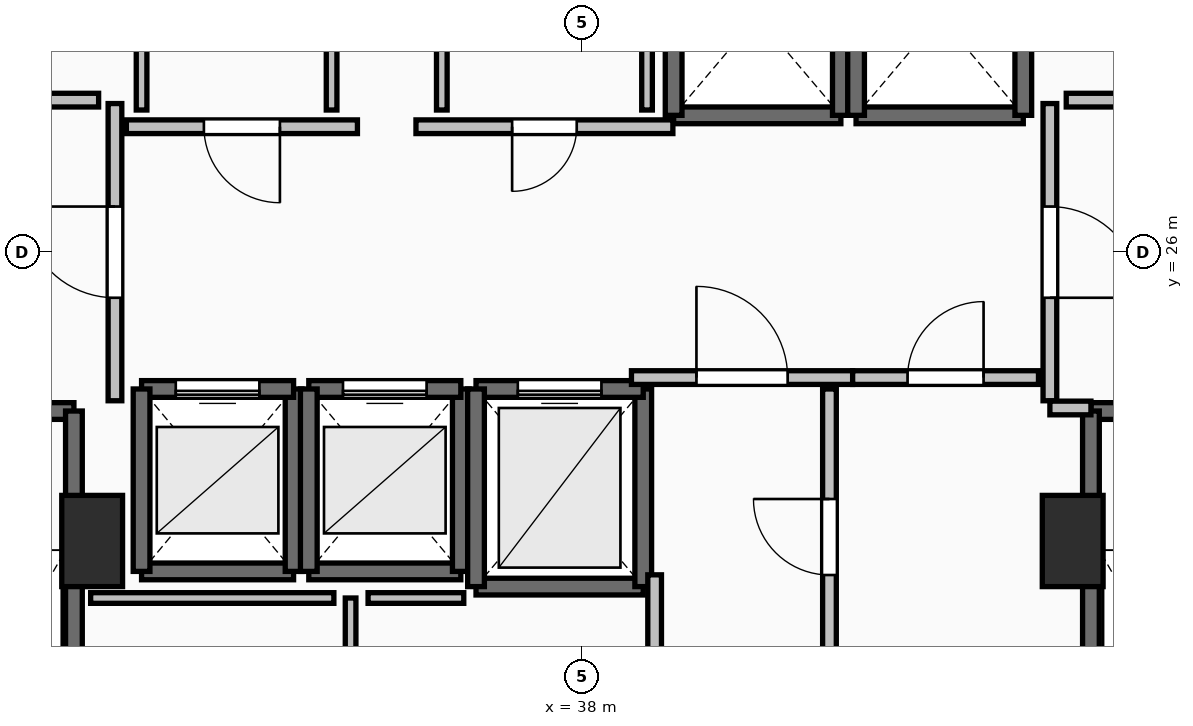
"""IFC4 building model, lengths in metres.
Left out: names, types, materials, properties, quantities, classifications, styles, units other than length and angle.
Written with IfcOpenShell. Run it as: python <this file> out.ifc"""

import sys

from ifc_helpers import new_model, si_unit, direction, frame, frame_2d, origin, origin_2d, place, context, subcontext, project, spatial, rectangle, extrude, element, fill, save


model = new_model("IFC4")
c1 = context("Model", 3, precision=1e-05, world=origin(), true_north=direction((0.0, 1.0)))
c2 = subcontext(c1, "Body", "Model", "MODEL_VIEW")
j1 = project(units=[si_unit("LENGTHUNIT", "METRE"), si_unit("PLANEANGLEUNIT", "RADIAN")], contexts=[c1])
p1 = place(None, origin())
s1 = spatial("IfcSite", under=j1, at=p1, CompositionType="ELEMENT")
p2 = place(p1, origin())
s2 = spatial("IfcBuilding", under=s1, at=p2, CompositionType="ELEMENT")
p3 = place(p2, frame((0.0, 0.0, 129.1)))
s3 = spatial("IfcBuildingStorey", under=s2, at=p3, CompositionType="ELEMENT", Elevation=129.1)
for number, where, z_axis, x_axis in (
    (1, (31.55, 22.2, 0.0), (0.0, 0.0, 1.0), (1.0, 0.0, 0.0)),
    (2, (44.45, 22.2, 0.0), (0.0, 0.0, 1.0), (1.0, 0.0, 0.0)),
):
    element("IfcColumn", number, at=place(p3, frame(where, z_axis=z_axis, x_axis=x_axis)), inside=s3, PredefinedType="PILASTER", context=c2, shape_type="SweptSolid", body=[
        extrude(rectangle(XDim=0.8, YDim=1.2, at=origin_2d()), origin(), (0.0, 0.0, 1.0), 3.5),
    ])
p4 = place(p3, frame((27.94, 23.91, 0.0), z_axis=(0.0, 0.0, 1.0), x_axis=(1.0, 0.0, 0.0)))
e3 = element("IfcWall", 3, at=p4, inside=s3, PredefinedType="SOLIDWALL", context=c2, shape_type="SweptSolid", body=[
    extrude(rectangle(XDim=3.37, YDim=0.22, at=frame_2d((1.685, 0.0))), origin(), (0.0, 0.0, 1.0), 3.24),
])
p5 = place(p4, frame((1.135, 0.0, 0.0)))
e4 = element("IfcOpeningElement", 4, at=p5, cuts=e3, PredefinedType="OPENING", context=c2, shape_type="SweptSolid", body=[
    extrude(rectangle(XDim=1.1, YDim=2.15, at=frame_2d((0.55, 1.075))), frame((0.0, 0.125, 0.0), z_axis=(0.0, -1.0, 0.0), x_axis=(1.0, 0.0, 0.0)), (0.0, 0.0, 1.0), 0.25),
])
p6 = place(p3, frame((31.31, 23.91, 0.0), z_axis=(0.0, 0.0, 1.0), x_axis=(0.0, -1.0, 0.0)))
e5 = element("IfcWall", 5, at=p6, inside=s3, PredefinedType="SOLIDWALL", context=c2, shape_type="SweptSolid", body=[
    extrude(rectangle(XDim=7.42, YDim=0.22, at=frame_2d((3.71, 0.0))), origin(), (0.0, 0.0, 1.0), 3.24),
])
p7 = place(p3, frame((44.69, 23.91, 0.0), z_axis=(0.0, 0.0, 1.0), x_axis=(1.0, 0.0, 0.0)))
e6 = element("IfcWall", 6, at=p7, inside=s3, PredefinedType="SOLIDWALL", context=c2, shape_type="SweptSolid", body=[
    extrude(rectangle(XDim=3.37, YDim=0.22, at=frame_2d((1.685, 0.0))), origin(), (0.0, 0.0, 1.0), 3.24),
])
p8 = place(p7, frame((1.135, 0.0, 0.0)))
e7 = element("IfcOpeningElement", 7, at=p8, cuts=e6, PredefinedType="OPENING", context=c2, shape_type="SweptSolid", body=[
    extrude(rectangle(XDim=1.1, YDim=2.15, at=frame_2d((0.55, 1.075))), frame((0.0, 0.125, 0.0), z_axis=(0.0, -1.0, 0.0), x_axis=(1.0, 0.0, 0.0)), (0.0, 0.0, 1.0), 0.25),
])
p9 = place(p3, frame((44.69, 16.49, 0.0), z_axis=(0.0, 0.0, 1.0), x_axis=(0.0, 1.0, 0.0)))
e8 = element("IfcWall", 8, at=p9, inside=s3, PredefinedType="SOLIDWALL", context=c2, shape_type="SweptSolid", body=[
    extrude(rectangle(XDim=7.42, YDim=0.22, at=frame_2d((3.71, 0.0))), origin(), (0.0, 0.0, 1.0), 3.24),
])
p10 = place(p3, frame((32.2, 21.8, 0.0), z_axis=(0.0, 0.0, 1.0), x_axis=(1.0, 0.0, 0.0)))
e9 = element("IfcWall", 9, at=p10, inside=s3, PredefinedType="SOLIDWALL", context=c2, shape_type="SweptSolid", body=[
    extrude(rectangle(XDim=2.0, YDim=0.22, at=frame_2d((1.0, 0.0))), origin(), (0.0, 0.0, 1.0), 3.24),
])
p11 = place(p3, frame((34.2, 21.8, 0.0), z_axis=(0.0, 0.0, 1.0), x_axis=(0.0, 1.0, 0.0)))
e10 = element("IfcWall", 10, at=p11, inside=s3, PredefinedType="SOLIDWALL", context=c2, shape_type="SweptSolid", body=[
    extrude(rectangle(XDim=2.4, YDim=0.22, at=frame_2d((1.2, 0.0))), origin(), (0.0, 0.0, 1.0), 3.24),
])
p12 = place(p3, frame((34.2, 24.2, 0.0), z_axis=(0.0, 0.0, 1.0), x_axis=(-1.0, 0.0, 0.0)))
e11 = element("IfcWall", 11, at=p12, inside=s3, PredefinedType="SOLIDWALL", context=c2, shape_type="SweptSolid", body=[
    extrude(rectangle(XDim=2.0, YDim=0.22, at=frame_2d((1.0, 0.0))), origin(), (0.0, 0.0, 1.0), 3.24),
])
p13 = place(p12, frame((0.45, 0.0, 0.0)))
e12 = element("IfcOpeningElement", 12, at=p13, cuts=e11, PredefinedType="OPENING", context=c2, shape_type="SweptSolid", body=[
    extrude(rectangle(XDim=1.1, YDim=2.2, at=frame_2d((0.55, 1.1))), frame((0.0, 0.125, 0.0), z_axis=(0.0, -1.0, 0.0), x_axis=(1.0, 0.0, 0.0)), (0.0, 0.0, 1.0), 0.25),
])
p14 = place(p3, frame((32.2, 24.2, 0.0), z_axis=(0.0, 0.0, 1.0), x_axis=(0.0, -1.0, 0.0)))
e13 = element("IfcWall", 13, at=p14, inside=s3, PredefinedType="SOLIDWALL", context=c2, shape_type="SweptSolid", body=[
    extrude(rectangle(XDim=2.4, YDim=0.22, at=frame_2d((1.2, 0.0))), origin(), (0.0, 0.0, 1.0), 3.24),
])
p15 = place(p3, frame((34.4, 21.8, 0.0), z_axis=(0.0, 0.0, 1.0), x_axis=(1.0, 0.0, 0.0)))
e14 = element("IfcWall", 14, at=p15, inside=s3, PredefinedType="SOLIDWALL", context=c2, shape_type="SweptSolid", body=[
    extrude(rectangle(XDim=2.0, YDim=0.22, at=frame_2d((1.0, 0.0))), origin(), (0.0, 0.0, 1.0), 3.24),
])
p16 = place(p3, frame((36.4, 21.8, 0.0), z_axis=(0.0, 0.0, 1.0), x_axis=(0.0, 1.0, 0.0)))
e15 = element("IfcWall", 15, at=p16, inside=s3, PredefinedType="SOLIDWALL", context=c2, shape_type="SweptSolid", body=[
    extrude(rectangle(XDim=2.4, YDim=0.22, at=frame_2d((1.2, 0.0))), origin(), (0.0, 0.0, 1.0), 3.24),
])
p17 = place(p3, frame((36.4, 24.2, 0.0), z_axis=(0.0, 0.0, 1.0), x_axis=(-1.0, 0.0, 0.0)))
e16 = element("IfcWall", 16, at=p17, inside=s3, PredefinedType="SOLIDWALL", context=c2, shape_type="SweptSolid", body=[
    extrude(rectangle(XDim=2.0, YDim=0.22, at=frame_2d((1.0, 0.0))), origin(), (0.0, 0.0, 1.0), 3.24),
])
p18 = place(p17, frame((0.45, 0.0, 0.0)))
e17 = element("IfcOpeningElement", 17, at=p18, cuts=e16, PredefinedType="OPENING", context=c2, shape_type="SweptSolid", body=[
    extrude(rectangle(XDim=1.1, YDim=2.2, at=frame_2d((0.55, 1.1))), frame((0.0, 0.125, 0.0), z_axis=(0.0, -1.0, 0.0), x_axis=(1.0, 0.0, 0.0)), (0.0, 0.0, 1.0), 0.25),
])
p19 = place(p3, frame((34.4, 24.2, 0.0), z_axis=(0.0, 0.0, 1.0), x_axis=(0.0, -1.0, 0.0)))
e18 = element("IfcWall", 18, at=p19, inside=s3, PredefinedType="SOLIDWALL", context=c2, shape_type="SweptSolid", body=[
    extrude(rectangle(XDim=2.4, YDim=0.22, at=frame_2d((1.2, 0.0))), origin(), (0.0, 0.0, 1.0), 3.24),
])
p20 = place(p3, frame((36.6, 21.6, 0.0), z_axis=(0.0, 0.0, 1.0), x_axis=(1.0, 0.0, 0.0)))
e19 = element("IfcWall", 19, at=p20, inside=s3, PredefinedType="SOLIDWALL", context=c2, shape_type="SweptSolid", body=[
    extrude(rectangle(XDim=2.2, YDim=0.22, at=frame_2d((1.1, 0.0))), origin(), (0.0, 0.0, 1.0), 3.24),
])
p21 = place(p3, frame((38.8, 21.6, 0.0), z_axis=(0.0, 0.0, 1.0), x_axis=(0.0, 1.0, 0.0)))
e20 = element("IfcWall", 20, at=p21, inside=s3, PredefinedType="SOLIDWALL", context=c2, shape_type="SweptSolid", body=[
    extrude(rectangle(XDim=2.6, YDim=0.22, at=frame_2d((1.3, 0.0))), origin(), (0.0, 0.0, 1.0), 3.24),
])
p22 = place(p3, frame((38.8, 24.2, 0.0), z_axis=(0.0, 0.0, 1.0), x_axis=(-1.0, 0.0, 0.0)))
e21 = element("IfcWall", 21, at=p22, inside=s3, PredefinedType="SOLIDWALL", context=c2, shape_type="SweptSolid", body=[
    extrude(rectangle(XDim=2.2, YDim=0.22, at=frame_2d((1.1, 0.0))), origin(), (0.0, 0.0, 1.0), 3.24),
])
p23 = place(p22, frame((0.55, 0.0, 0.0)))
e22 = element("IfcOpeningElement", 22, at=p23, cuts=e21, PredefinedType="OPENING", context=c2, shape_type="SweptSolid", body=[
    extrude(rectangle(XDim=1.1, YDim=2.2, at=frame_2d((0.55, 1.1))), frame((0.0, 0.125, 0.0), z_axis=(0.0, -1.0, 0.0), x_axis=(1.0, 0.0, 0.0)), (0.0, 0.0, 1.0), 0.25),
])
p24 = place(p3, frame((36.6, 24.2, 0.0), z_axis=(0.0, 0.0, 1.0), x_axis=(0.0, -1.0, 0.0)))
e23 = element("IfcWall", 23, at=p24, inside=s3, PredefinedType="SOLIDWALL", context=c2, shape_type="SweptSolid", body=[
    extrude(rectangle(XDim=2.6, YDim=0.22, at=frame_2d((1.3, 0.0))), origin(), (0.0, 0.0, 1.0), 3.24),
])
p25 = place(p3, frame((39.2, 27.8, 0.0), z_axis=(0.0, 0.0, 1.0), x_axis=(1.0, 0.0, 0.0)))
e24 = element("IfcWall", 24, at=p25, inside=s3, PredefinedType="SOLIDWALL", context=c2, shape_type="SweptSolid", body=[
    extrude(rectangle(XDim=2.2, YDim=0.22, at=frame_2d((1.1, 0.0))), origin(), (0.0, 0.0, 1.0), 3.24),
])
for number, where, z_axis, x_axis in (
    (25, (41.4, 27.8, 0.0), (0.0, 0.0, 1.0), (0.0, 1.0, 0.0)),
    (26, (39.2, 30.4, 0.0), (0.0, 0.0, 1.0), (0.0, -1.0, 0.0)),
):
    element("IfcWall", number, at=place(p3, frame(where, z_axis=z_axis, x_axis=x_axis)), inside=s3, PredefinedType="SOLIDWALL", context=c2, shape_type="SweptSolid", body=[
        extrude(rectangle(XDim=2.6, YDim=0.22, at=frame_2d((1.3, 0.0))), origin(), (0.0, 0.0, 1.0), 3.24),
    ])
p26 = place(p3, frame((41.6, 27.8, 0.0), z_axis=(0.0, 0.0, 1.0), x_axis=(1.0, 0.0, 0.0)))
e27 = element("IfcWall", 27, at=p26, inside=s3, PredefinedType="SOLIDWALL", context=c2, shape_type="SweptSolid", body=[
    extrude(rectangle(XDim=2.2, YDim=0.22, at=frame_2d((1.1, 0.0))), origin(), (0.0, 0.0, 1.0), 3.24),
])
for number, where, z_axis, x_axis in (
    (28, (43.8, 27.8, 0.0), (0.0, 0.0, 1.0), (0.0, 1.0, 0.0)),
    (29, (41.6, 30.4, 0.0), (0.0, 0.0, 1.0), (0.0, -1.0, 0.0)),
):
    element("IfcWall", number, at=place(p3, frame(where, z_axis=z_axis, x_axis=x_axis)), inside=s3, PredefinedType="SOLIDWALL", context=c2, shape_type="SweptSolid", body=[
        extrude(rectangle(XDim=2.6, YDim=0.22, at=frame_2d((1.3, 0.0))), origin(), (0.0, 0.0, 1.0), 3.24),
    ])
p27 = place(p3, frame((31.85, 24.045, 0.0), z_axis=(0.0, 0.0, 1.0), x_axis=(0.0, 1.0, 0.0)))
e30 = element("IfcWall", 30, at=p27, inside=s3, PredefinedType="PARTITIONING", context=c2, shape_type="SweptSolid", body=[
    extrude(rectangle(XDim=3.91, YDim=0.18, at=frame_2d((1.955, 0.0))), origin(), (0.0, 0.0, 1.0), 3.24),
])
p28 = place(p27, frame((1.355, 0.0, 0.0)))
e31 = element("IfcOpeningElement", 31, at=p28, cuts=e30, PredefinedType="OPENING", context=c2, shape_type="SweptSolid", body=[
    extrude(rectangle(XDim=1.2, YDim=2.15, at=frame_2d((0.6, 1.075))), frame((0.0, 0.105, 0.0), z_axis=(0.0, -1.0, 0.0), x_axis=(1.0, 0.0, 0.0)), (0.0, 0.0, 1.0), 0.21),
])
p29 = place(p3, frame((44.15, 27.955, 0.0), z_axis=(0.0, 0.0, 1.0), x_axis=(0.0, -1.0, 0.0)))
e32 = element("IfcWall", 32, at=p29, inside=s3, PredefinedType="PARTITIONING", context=c2, shape_type="SweptSolid", body=[
    extrude(rectangle(XDim=3.91, YDim=0.18, at=frame_2d((1.955, 0.0))), origin(), (0.0, 0.0, 1.0), 3.24),
])
p30 = place(p29, frame((1.355, 0.0, 0.0)))
e33 = element("IfcOpeningElement", 33, at=p30, cuts=e32, PredefinedType="OPENING", context=c2, shape_type="SweptSolid", body=[
    extrude(rectangle(XDim=1.2, YDim=2.15, at=frame_2d((0.6, 1.075))), frame((0.0, 0.105, 0.0), z_axis=(0.0, -1.0, 0.0), x_axis=(1.0, 0.0, 0.0)), (0.0, 0.0, 1.0), 0.21),
])
p31 = place(p3, frame((44.15, 23.95, 0.0), z_axis=(0.0, 0.0, 1.0), x_axis=(1.0, 0.0, 0.0)))
e34 = element("IfcWall", 34, at=p31, inside=s3, PredefinedType="PARTITIONING", context=c2, shape_type="SweptSolid", body=[
    extrude(rectangle(XDim=0.54, YDim=0.18, at=frame_2d((0.27, 0.0))), origin(), (0.0, 0.0, 1.0), 3.24),
])
p32 = place(p3, frame((38.645, 24.35, 0.0), z_axis=(0.0, 0.0, 1.0), x_axis=(1.0, 0.0, 0.0)))
e35 = element("IfcWall", 35, at=p32, inside=s3, PredefinedType="PARTITIONING", context=c2, shape_type="SweptSolid", body=[
    extrude(rectangle(XDim=2.91, YDim=0.18, at=frame_2d((1.455, 0.0))), origin(), (0.0, 0.0, 1.0), 3.24),
])
p33 = place(p32, frame((0.855, 0.0, 0.0)))
e36 = element("IfcOpeningElement", 36, at=p33, cuts=e35, PredefinedType="OPENING", context=c2, shape_type="SweptSolid", body=[
    extrude(rectangle(XDim=1.2, YDim=2.15, at=frame_2d((0.6, 1.075))), frame((0.0, 0.105, 0.0), z_axis=(0.0, -1.0, 0.0), x_axis=(1.0, 0.0, 0.0)), (0.0, 0.0, 1.0), 0.21),
])
p34 = place(p3, frame((41.555, 24.35, 0.0), z_axis=(0.0, 0.0, 1.0), x_axis=(1.0, 0.0, 0.0)))
e37 = element("IfcWall", 37, at=p34, inside=s3, PredefinedType="PARTITIONING", context=c2, shape_type="SweptSolid", body=[
    extrude(rectangle(XDim=2.445, YDim=0.18, at=frame_2d((1.223, 0.0))), origin(), (0.0, 0.0, 1.0), 3.24),
])
p35 = place(p34, frame((0.722, 0.0, 0.0)))
e38 = element("IfcOpeningElement", 38, at=p35, cuts=e37, PredefinedType="OPENING", context=c2, shape_type="SweptSolid", body=[
    extrude(rectangle(XDim=1.0, YDim=2.15, at=frame_2d((0.5, 1.075))), frame((0.0, 0.105, 0.0), z_axis=(0.0, -1.0, 0.0), x_axis=(1.0, 0.0, 0.0)), (0.0, 0.0, 1.0), 0.21),
])
p36 = place(p3, frame((35.04, 27.65, 0.0), z_axis=(0.0, 0.0, 1.0), x_axis=(-1.0, 0.0, 0.0)))
e39 = element("IfcWall", 39, at=p36, inside=s3, PredefinedType="PARTITIONING", context=c2, shape_type="SweptSolid", body=[
    extrude(rectangle(XDim=3.04, YDim=0.18, at=frame_2d((1.52, 0.0))), origin(), (0.0, 0.0, 1.0), 3.24),
])
p37 = place(p36, frame((1.02, 0.0, 0.0)))
e40 = element("IfcOpeningElement", 40, at=p37, cuts=e39, PredefinedType="OPENING", context=c2, shape_type="SweptSolid", body=[
    extrude(rectangle(XDim=1.0, YDim=2.15, at=frame_2d((0.5, 1.075))), frame((0.0, 0.105, 0.0), z_axis=(0.0, -1.0, 0.0), x_axis=(1.0, 0.0, 0.0)), (0.0, 0.0, 1.0), 0.21),
])
p38 = place(p3, frame((39.19, 27.65, 0.0), z_axis=(0.0, 0.0, 1.0), x_axis=(-1.0, 0.0, 0.0)))
e41 = element("IfcWall", 41, at=p38, inside=s3, PredefinedType="PARTITIONING", context=c2, shape_type="SweptSolid", body=[
    extrude(rectangle(XDim=3.38, YDim=0.18, at=frame_2d((1.69, 0.0))), origin(), (0.0, 0.0, 1.0), 3.24),
])
p39 = place(p38, frame((1.265, 0.0, 0.0)))
e42 = element("IfcOpeningElement", 42, at=p39, cuts=e41, PredefinedType="OPENING", context=c2, shape_type="SweptSolid", body=[
    extrude(rectangle(XDim=0.85, YDim=2.1, at=frame_2d((0.425, 1.05))), frame((0.0, 0.105, 0.0), z_axis=(0.0, -1.0, 0.0), x_axis=(1.0, 0.0, 0.0)), (0.0, 0.0, 1.0), 0.21),
])
p40 = place(p3, frame((41.25, 20.305, 0.0), z_axis=(0.0, 0.0, 1.0), x_axis=(0.0, 1.0, 0.0)))
e43 = element("IfcWall", 43, at=p40, inside=s3, PredefinedType="PARTITIONING", context=c2, shape_type="SweptSolid", body=[
    extrude(rectangle(XDim=3.895, YDim=0.18, at=frame_2d((1.948, 0.0))), origin(), (0.0, 0.0, 1.0), 3.24),
])
p41 = place(p40, frame((1.448, 0.0, 0.0)))
e44 = element("IfcOpeningElement", 44, at=p41, cuts=e43, PredefinedType="OPENING", context=c2, shape_type="SweptSolid", body=[
    extrude(rectangle(XDim=1.0, YDim=2.15, at=frame_2d((0.5, 1.075))), frame((0.0, 0.105, 0.0), z_axis=(0.0, -1.0, 0.0), x_axis=(1.0, 0.0, 0.0)), (0.0, 0.0, 1.0), 0.21),
])
p42 = place(p3, frame((38.95, 21.755, 0.0), z_axis=(0.0, 0.0, 1.0), x_axis=(0.0, -1.0, 0.0)))
e45 = element("IfcWall", 45, at=p42, inside=s3, PredefinedType="PARTITIONING", context=c2, shape_type="SweptSolid", body=[
    extrude(rectangle(XDim=5.435, YDim=0.18, at=frame_2d((2.717, 0.0))), origin(), (0.0, 0.0, 1.0), 3.24),
])
p43 = place(p42, frame((2.218, 0.0, 0.0)))
e46 = element("IfcOpeningElement", 46, at=p43, cuts=e45, PredefinedType="OPENING", context=c2, shape_type="SweptSolid", body=[
    extrude(rectangle(XDim=1.0, YDim=2.15, at=frame_2d((0.5, 1.075))), frame((0.0, 0.105, 0.0), z_axis=(0.0, -1.0, 0.0), x_axis=(1.0, 0.0, 0.0)), (0.0, 0.0, 1.0), 0.21),
])
p44 = place(p3, frame((34.95, 16.32, 0.0), z_axis=(0.0, 0.0, 1.0), x_axis=(0.0, 1.0, 0.0)))
e47 = element("IfcWall", 47, at=p44, inside=s3, PredefinedType="PARTITIONING", context=c2, shape_type="SweptSolid", body=[
    extrude(rectangle(XDim=5.13, YDim=0.14, at=frame_2d((2.565, 0.0))), origin(), (0.0, 0.0, 1.0), 3.24),
])
for number, where, z_axis, x_axis in (
    (48, (31.635, 28.0, 0.0), (0.0, 0.0, 1.0), (-1.0, 0.0, 0.0)),
    (49, (45.28, 28.0, 0.0), (0.0, 0.0, 1.0), (-1.0, 0.0, 0.0)),
):
    element("IfcWall", number, at=place(p3, frame(where, z_axis=z_axis, x_axis=x_axis)), inside=s3, PredefinedType="PARTITIONING", context=c2, shape_type="SweptSolid", body=[
        extrude(rectangle(XDim=0.915, YDim=0.18, at=frame_2d((0.458, 0.0))), origin(), (0.0, 0.0, 1.0), 3.24),
    ])
p45 = place(p3, frame((34.73, 21.45, 0.0), z_axis=(0.0, 0.0, 1.0), x_axis=(-1.0, 0.0, 0.0)))
e50 = element("IfcWall", 50, at=p45, inside=s3, PredefinedType="PARTITIONING", context=c2, shape_type="SweptSolid", body=[
    extrude(rectangle(XDim=3.2, YDim=0.14, at=frame_2d((1.6, 0.0))), origin(), (0.0, 0.0, 1.0), 3.24),
])
p46 = place(p3, frame((36.439, 21.45, 0.0), z_axis=(0.0, 0.0, 1.0), x_axis=(-1.0, 0.0, 0.0)))
e51 = element("IfcWall", 51, at=p46, inside=s3, PredefinedType="PARTITIONING", context=c2, shape_type="SweptSolid", body=[
    extrude(rectangle(XDim=1.259, YDim=0.14, at=frame_2d((0.629, 0.0))), origin(), (0.0, 0.0, 1.0), 3.24),
])
for number, where, z_axis, x_axis in (
    (52, (32.2, 30.26, 0.0), (0.0, 0.0, 1.0), (0.0, -1.0, 0.0)),
    (53, (34.7, 27.87, 0.0), (0.0, 0.0, 1.0), (0.0, 1.0, 0.0)),
    (54, (36.15, 30.26, 0.0), (0.0, 0.0, 1.0), (0.0, -1.0, 0.0)),
    (55, (38.85, 27.87, 0.0), (0.0, 0.0, 1.0), (0.0, 1.0, 0.0)),
):
    element("IfcWall", number, at=place(p3, frame(where, z_axis=z_axis, x_axis=x_axis)), inside=s3, PredefinedType="PARTITIONING", context=c2, shape_type="SweptSolid", body=[
        extrude(rectangle(XDim=2.39, YDim=0.14, at=frame_2d((1.195, 0.0))), origin(), (0.0, 0.0, 1.0), 3.24),
    ])
p47 = place(p13, origin())
e56 = element("IfcDoor", 56, at=p47, inside=s3, OperationType="SLIDING_TO_LEFT", PredefinedType="DOOR", context=c2, shape_type="SweptSolid", body=[
    extrude(rectangle(XDim=1.1, YDim=2.2, at=frame_2d((0.55, 1.1))), frame((0.0, 0.025, 0.0), z_axis=(0.0, -1.0, 0.0), x_axis=(1.0, 0.0, 0.0)), (0.0, 0.0, 1.0), 0.05),
])
fill(e12, e56)
p48 = place(p18, origin())
e57 = element("IfcDoor", 57, at=p48, inside=s3, OperationType="SLIDING_TO_LEFT", PredefinedType="DOOR", context=c2, shape_type="SweptSolid", body=[
    extrude(rectangle(XDim=1.1, YDim=2.2, at=frame_2d((0.55, 1.1))), frame((0.0, 0.025, 0.0), z_axis=(0.0, -1.0, 0.0), x_axis=(1.0, 0.0, 0.0)), (0.0, 0.0, 1.0), 0.05),
])
fill(e17, e57)
p49 = place(p23, origin())
e58 = element("IfcDoor", 58, at=p49, inside=s3, OperationType="SLIDING_TO_LEFT", PredefinedType="DOOR", context=c2, shape_type="SweptSolid", body=[
    extrude(rectangle(XDim=1.1, YDim=2.2, at=frame_2d((0.55, 1.1))), frame((0.0, 0.025, 0.0), z_axis=(0.0, -1.0, 0.0), x_axis=(1.0, 0.0, 0.0)), (0.0, 0.0, 1.0), 0.05),
])
fill(e22, e58)
p50 = place(p28, origin())
e59 = element("IfcDoor", 59, at=p50, inside=s3, OperationType="SINGLE_SWING_RIGHT", PredefinedType="DOOR", context=c2, shape_type="SweptSolid", body=[
    extrude(rectangle(XDim=1.2, YDim=2.15, at=frame_2d((0.6, 1.075))), frame((0.0, 0.025, 0.0), z_axis=(0.0, -1.0, 0.0), x_axis=(1.0, 0.0, 0.0)), (0.0, 0.0, 1.0), 0.05),
])
fill(e31, e59)
p51 = place(p30, origin())
e60 = element("IfcDoor", 60, at=p51, inside=s3, OperationType="SINGLE_SWING_RIGHT", PredefinedType="DOOR", context=c2, shape_type="SweptSolid", body=[
    extrude(rectangle(XDim=1.2, YDim=2.15, at=frame_2d((0.6, 1.075))), frame((0.0, 0.025, 0.0), z_axis=(0.0, -1.0, 0.0), x_axis=(1.0, 0.0, 0.0)), (0.0, 0.0, 1.0), 0.05),
])
fill(e33, e60)
p52 = place(p33, origin())
e61 = element("IfcDoor", 61, at=p52, inside=s3, OperationType="SINGLE_SWING_LEFT", PredefinedType="DOOR", context=c2, shape_type="SweptSolid", body=[
    extrude(rectangle(XDim=1.2, YDim=2.15, at=frame_2d((0.6, 1.075))), frame((0.0, 0.025, 0.0), z_axis=(0.0, -1.0, 0.0), x_axis=(1.0, 0.0, 0.0)), (0.0, 0.0, 1.0), 0.05),
])
fill(e36, e61)
p53 = place(p35, origin())
e62 = element("IfcDoor", 62, at=p53, inside=s3, OperationType="SINGLE_SWING_RIGHT", PredefinedType="DOOR", context=c2, shape_type="SweptSolid", body=[
    extrude(rectangle(XDim=1.0, YDim=2.15, at=frame_2d((0.5, 1.075))), frame((0.0, 0.025, 0.0), z_axis=(0.0, -1.0, 0.0), x_axis=(1.0, 0.0, 0.0)), (0.0, 0.0, 1.0), 0.05),
])
fill(e38, e62)
p54 = place(p37, origin())
e63 = element("IfcDoor", 63, at=p54, inside=s3, OperationType="SINGLE_SWING_LEFT", PredefinedType="DOOR", context=c2, shape_type="SweptSolid", body=[
    extrude(rectangle(XDim=1.0, YDim=2.15, at=frame_2d((0.5, 1.075))), frame((0.0, 0.025, 0.0), z_axis=(0.0, -1.0, 0.0), x_axis=(1.0, 0.0, 0.0)), (0.0, 0.0, 1.0), 0.05),
])
fill(e40, e63)
p55 = place(p39, origin())
e64 = element("IfcDoor", 64, at=p55, inside=s3, OperationType="SINGLE_SWING_RIGHT", PredefinedType="DOOR", context=c2, shape_type="SweptSolid", body=[
    extrude(rectangle(XDim=0.85, YDim=2.1, at=frame_2d((0.425, 1.05))), frame((0.0, 0.025, 0.0), z_axis=(0.0, -1.0, 0.0), x_axis=(1.0, 0.0, 0.0)), (0.0, 0.0, 1.0), 0.05),
])
fill(e42, e64)
p56 = place(p41, origin())
e65 = element("IfcDoor", 65, at=p56, inside=s3, OperationType="SINGLE_SWING_RIGHT", PredefinedType="DOOR", context=c2, shape_type="SweptSolid", body=[
    extrude(rectangle(XDim=1.0, YDim=2.15, at=frame_2d((0.5, 1.075))), frame((0.0, 0.025, 0.0), z_axis=(0.0, -1.0, 0.0), x_axis=(1.0, 0.0, 0.0)), (0.0, 0.0, 1.0), 0.05),
])
fill(e44, e65)
save(model, sys.argv[1])
